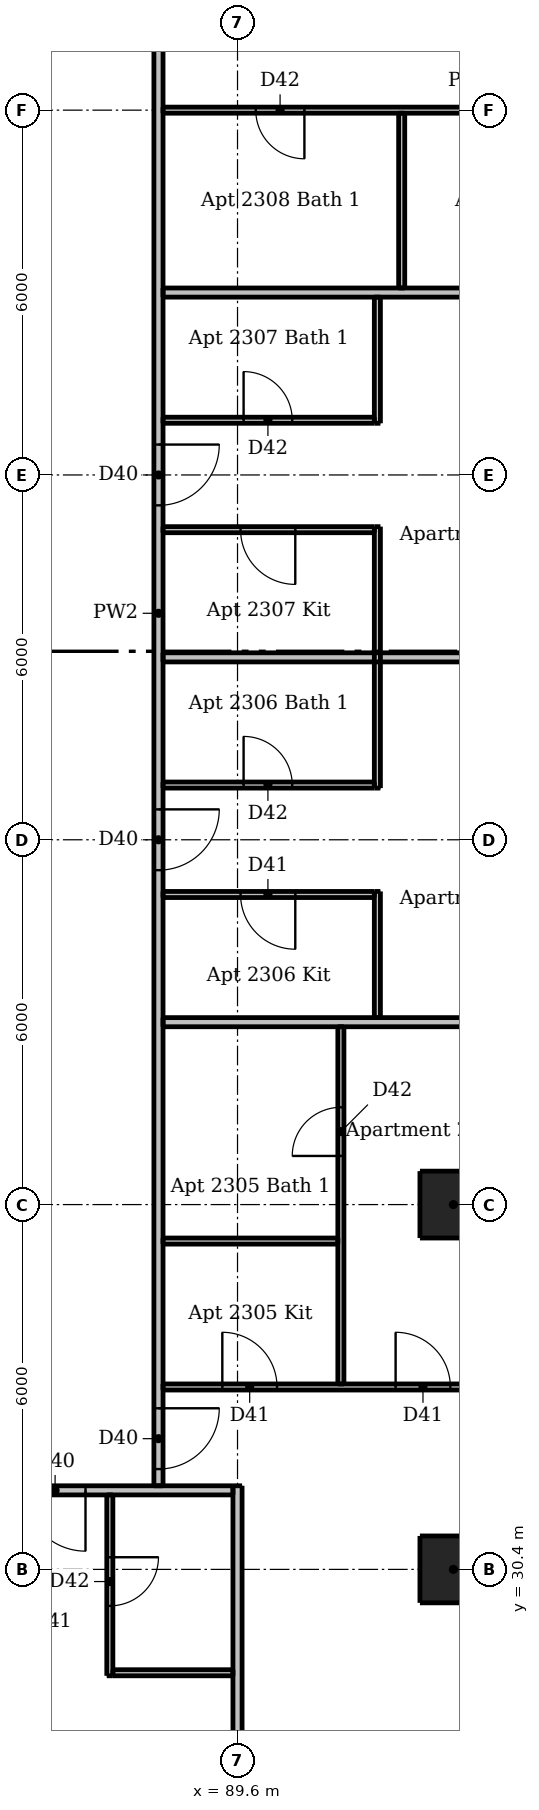
"""IFC4 building model, lengths in metres.
Left out: names, types, materials, properties, quantities, classifications, styles, units other than length and angle.
Written with IfcOpenShell. Run it as: python <this file> out.ifc"""

import sys

from ifc_helpers import new_model, si_unit, direction, frame, frame_2d, origin, origin_2d, place, context, subcontext, project, spatial, rectangle, extrude, element, fill, save


model = new_model("IFC4")
c1 = context("Model", 3, precision=1e-05, world=origin(), true_north=direction((0.0, 1.0)))
c2 = subcontext(c1, "Body", "Model", "MODEL_VIEW")
j1 = project(units=[si_unit("LENGTHUNIT", "METRE"), si_unit("PLANEANGLEUNIT", "RADIAN")], contexts=[c1])
p1 = place(None, origin())
s1 = spatial("IfcSite", under=j1, at=p1, CompositionType="ELEMENT")
p2 = place(p1, origin())
s2 = spatial("IfcBuilding", under=s1, at=p2, CompositionType="ELEMENT")
p3 = place(p2, frame((0.0, 0.0, 88.6)))
s3 = spatial("IfcBuildingStorey", under=s2, at=p3, CompositionType="ELEMENT", Elevation=88.6)
for number, where, z_axis, x_axis in (
    (1, (93.15, 30.4, 0.0), (0.0, 0.0, 1.0), (1.0, 0.0, 0.0)),
    (2, (93.15, 36.4, 0.0), (0.0, 0.0, 1.0), (1.0, 0.0, 0.0)),
):
    element("IfcColumn", number, at=place(p3, frame(where, z_axis=z_axis, x_axis=x_axis)), inside=s3, PredefinedType="COLUMN", context=c2, shape_type="SweptSolid", body=[
        extrude(rectangle(XDim=1.1, YDim=1.1, at=origin_2d()), origin(), (0.0, 0.0, 1.0), 3.05),
    ])
p4 = place(p3, frame((87.5, 31.625, 0.0), z_axis=(0.0, 0.0, 1.0), x_axis=(0.0, -1.0, 0.0)))
e3 = element("IfcWall", 3, at=p4, inside=s3, PredefinedType="PARTITIONING", context=c2, shape_type="SweptSolid", body=[
    extrude(rectangle(XDim=2.975, YDim=0.1, at=frame_2d((1.488, 0.0))), origin(), (0.0, 0.0, 1.0), 3.05),
])
p5 = place(p4, frame((1.025, 0.0, 0.0)))
e4 = element("IfcOpeningElement", 4, at=p5, cuts=e3, PredefinedType="OPENING", context=c2, shape_type="SweptSolid", body=[
    extrude(rectangle(XDim=0.8, YDim=2.1, at=frame_2d((0.4, 1.05))), frame((0.0, 0.06, 0.0), z_axis=(0.0, -1.0, 0.0), x_axis=(1.0, 0.0, 0.0)), (0.0, 0.0, 1.0), 0.12),
])
p6 = place(p3, frame((91.3, 33.45, 0.0), z_axis=(0.0, 0.0, 1.0), x_axis=(0.0, 1.0, 0.0)))
e5 = element("IfcWall", 5, at=p6, inside=s3, PredefinedType="PARTITIONING", context=c2, shape_type="SweptSolid", body=[
    extrude(rectangle(XDim=5.875, YDim=0.1, at=frame_2d((2.938, 0.0))), origin(), (0.0, 0.0, 1.0), 3.05),
])
p7 = place(p6, frame((3.75, 0.0, 0.0)))
e6 = element("IfcOpeningElement", 6, at=p7, cuts=e5, PredefinedType="OPENING", context=c2, shape_type="SweptSolid", body=[
    extrude(rectangle(XDim=0.8, YDim=2.1, at=frame_2d((0.4, 1.05))), frame((0.0, 0.06, 0.0), z_axis=(0.0, -1.0, 0.0), x_axis=(1.0, 0.0, 0.0)), (0.0, 0.0, 1.0), 0.12),
])
p8 = place(p3, frame((91.9, 39.475, 0.0), z_axis=(0.0, 0.0, 1.0), x_axis=(0.0, 1.0, 0.0)))
e7 = element("IfcWall", 7, at=p8, inside=s3, PredefinedType="PARTITIONING", context=c2, shape_type="SweptSolid", body=[
    extrude(rectangle(XDim=2.075, YDim=0.1, at=frame_2d((1.038, 0.0))), origin(), (0.0, 0.0, 1.0), 3.05),
])
p9 = place(p3, frame((91.9, 43.25, 0.0), z_axis=(0.0, 0.0, 1.0), x_axis=(0.0, 1.0, 0.0)))
e8 = element("IfcWall", 8, at=p9, inside=s3, PredefinedType="PARTITIONING", context=c2, shape_type="SweptSolid", body=[
    extrude(rectangle(XDim=4.3, YDim=0.1, at=frame_2d((2.15, 0.0))), origin(), (0.0, 0.0, 1.0), 3.05),
])
p10 = place(p3, frame((91.9, 49.25, 0.0), z_axis=(0.0, 0.0, 1.0), x_axis=(0.0, 1.0, 0.0)))
e9 = element("IfcWall", 9, at=p10, inside=s3, PredefinedType="PARTITIONING", context=c2, shape_type="SweptSolid", body=[
    extrude(rectangle(XDim=2.075, YDim=0.1, at=frame_2d((1.038, 0.0))), origin(), (0.0, 0.0, 1.0), 3.05),
])
p11 = place(p3, frame((92.3, 51.475, 0.0), z_axis=(0.0, 0.0, 1.0), x_axis=(0.0, 1.0, 0.0)))
e10 = element("IfcWall", 10, at=p11, inside=s3, PredefinedType="PARTITIONING", context=c2, shape_type="SweptSolid", body=[
    extrude(rectangle(XDim=2.875, YDim=0.1, at=frame_2d((1.438, 0.0))), origin(), (0.0, 0.0, 1.0), 3.05),
])
p12 = place(p3, frame((98.5, 54.4, 0.0), z_axis=(0.0, 0.0, 1.0), x_axis=(-1.0, 0.0, 0.0)))
e11 = element("IfcWall", 11, at=p12, inside=s3, PredefinedType="PARTITIONING", context=c2, shape_type="SweptSolid", body=[
    extrude(rectangle(XDim=10.125, YDim=0.1, at=frame_2d((5.062, 0.0))), origin(), (0.0, 0.0, 1.0), 2.516),
])
p13 = place(p12, frame((2.65, 0.0, 0.0)))
e12 = element("IfcOpeningElement", 12, at=p13, cuts=e11, PredefinedType="OPENING", context=c2, shape_type="SweptSolid", body=[
    extrude(rectangle(XDim=0.9, YDim=2.1, at=frame_2d((0.45, 1.05))), frame((0.0, 0.06, 0.0), z_axis=(0.0, -1.0, 0.0), x_axis=(1.0, 0.0, 0.0)), (0.0, 0.0, 1.0), 0.12),
])
p14 = place(p12, frame((7.8, 0.0, 0.0)))
e13 = element("IfcOpeningElement", 13, at=p14, cuts=e11, PredefinedType="OPENING", context=c2, shape_type="SweptSolid", body=[
    extrude(rectangle(XDim=0.8, YDim=2.1, at=frame_2d((0.4, 1.05))), frame((0.0, 0.06, 0.0), z_axis=(0.0, -1.0, 0.0), x_axis=(1.0, 0.0, 0.0)), (0.0, 0.0, 1.0), 0.12),
])
p15 = place(p3, frame((88.375, 49.3, 0.0), z_axis=(0.0, 0.0, 1.0), x_axis=(1.0, 0.0, 0.0)))
e14 = element("IfcWall", 14, at=p15, inside=s3, PredefinedType="PARTITIONING", context=c2, shape_type="SweptSolid", body=[
    extrude(rectangle(XDim=3.475, YDim=0.1, at=frame_2d((1.738, 0.0))), origin(), (0.0, 0.0, 1.0), 3.05),
])
p16 = place(p15, frame((1.325, 0.0, 0.0)))
e15 = element("IfcOpeningElement", 15, at=p16, cuts=e14, PredefinedType="OPENING", context=c2, shape_type="SweptSolid", body=[
    extrude(rectangle(XDim=0.8, YDim=2.1, at=frame_2d((0.4, 1.05))), frame((0.0, 0.06, 0.0), z_axis=(0.0, -1.0, 0.0), x_axis=(1.0, 0.0, 0.0)), (0.0, 0.0, 1.0), 0.12),
])
p17 = place(p3, frame((91.85, 47.5, 0.0), z_axis=(0.0, 0.0, 1.0), x_axis=(-1.0, 0.0, 0.0)))
e16 = element("IfcWall", 16, at=p17, inside=s3, PredefinedType="PARTITIONING", context=c2, shape_type="SweptSolid", body=[
    extrude(rectangle(XDim=3.475, YDim=0.1, at=frame_2d((1.738, 0.0))), origin(), (0.0, 0.0, 1.0), 3.05),
])
p18 = place(p17, frame((1.3, 0.0, 0.0)))
e17 = element("IfcOpeningElement", 17, at=p18, cuts=e16, PredefinedType="OPENING", context=c2, shape_type="SweptSolid", body=[
    extrude(rectangle(XDim=0.9, YDim=2.1, at=frame_2d((0.45, 1.05))), frame((0.0, 0.06, 0.0), z_axis=(0.0, -1.0, 0.0), x_axis=(1.0, 0.0, 0.0)), (0.0, 0.0, 1.0), 0.12),
])
p19 = place(p3, frame((88.375, 43.3, 0.0), z_axis=(0.0, 0.0, 1.0), x_axis=(1.0, 0.0, 0.0)))
e18 = element("IfcWall", 18, at=p19, inside=s3, PredefinedType="PARTITIONING", context=c2, shape_type="SweptSolid", body=[
    extrude(rectangle(XDim=3.475, YDim=0.1, at=frame_2d((1.738, 0.0))), origin(), (0.0, 0.0, 1.0), 3.05),
])
p20 = place(p19, frame((1.325, 0.0, 0.0)))
e19 = element("IfcOpeningElement", 19, at=p20, cuts=e18, PredefinedType="OPENING", context=c2, shape_type="SweptSolid", body=[
    extrude(rectangle(XDim=0.8, YDim=2.1, at=frame_2d((0.4, 1.05))), frame((0.0, 0.06, 0.0), z_axis=(0.0, -1.0, 0.0), x_axis=(1.0, 0.0, 0.0)), (0.0, 0.0, 1.0), 0.12),
])
p21 = place(p3, frame((91.85, 41.5, 0.0), z_axis=(0.0, 0.0, 1.0), x_axis=(-1.0, 0.0, 0.0)))
e20 = element("IfcWall", 20, at=p21, inside=s3, PredefinedType="PARTITIONING", context=c2, shape_type="SweptSolid", body=[
    extrude(rectangle(XDim=3.475, YDim=0.1, at=frame_2d((1.738, 0.0))), origin(), (0.0, 0.0, 1.0), 3.05),
])
p22 = place(p21, frame((1.3, 0.0, 0.0)))
e21 = element("IfcOpeningElement", 21, at=p22, cuts=e20, PredefinedType="OPENING", context=c2, shape_type="SweptSolid", body=[
    extrude(rectangle(XDim=0.9, YDim=2.1, at=frame_2d((0.45, 1.05))), frame((0.0, 0.06, 0.0), z_axis=(0.0, -1.0, 0.0), x_axis=(1.0, 0.0, 0.0)), (0.0, 0.0, 1.0), 0.12),
])
p23 = place(p3, frame((88.375, 35.8, 0.0), z_axis=(0.0, 0.0, 1.0), x_axis=(1.0, 0.0, 0.0)))
e22 = element("IfcWall", 22, at=p23, inside=s3, PredefinedType="PARTITIONING", context=c2, shape_type="SweptSolid", body=[
    extrude(rectangle(XDim=2.875, YDim=0.1, at=frame_2d((1.438, 0.0))), origin(), (0.0, 0.0, 1.0), 3.05),
])
p24 = place(p3, frame((88.375, 33.4, 0.0), z_axis=(0.0, 0.0, 1.0), x_axis=(1.0, 0.0, 0.0)))
e23 = element("IfcWall", 23, at=p24, inside=s3, PredefinedType="PARTITIONING", context=c2, shape_type="SweptSolid", body=[
    extrude(rectangle(XDim=5.625, YDim=0.1, at=frame_2d((2.812, 0.0))), origin(), (0.0, 0.0, 1.0), 3.05),
])
p25 = place(p24, frame((0.975, 0.0, 0.0)))
e24 = element("IfcOpeningElement", 24, at=p25, cuts=e23, PredefinedType="OPENING", context=c2, shape_type="SweptSolid", body=[
    extrude(rectangle(XDim=0.9, YDim=2.1, at=frame_2d((0.45, 1.05))), frame((0.0, 0.06, 0.0), z_axis=(0.0, -1.0, 0.0), x_axis=(1.0, 0.0, 0.0)), (0.0, 0.0, 1.0), 0.12),
])
p26 = place(p24, frame((3.825, 0.0, 0.0)))
e25 = element("IfcOpeningElement", 25, at=p26, cuts=e23, PredefinedType="OPENING", context=c2, shape_type="SweptSolid", body=[
    extrude(rectangle(XDim=0.9, YDim=2.1, at=frame_2d((0.45, 1.05))), frame((0.0, 0.06, 0.0), z_axis=(0.0, -1.0, 0.0), x_axis=(1.0, 0.0, 0.0)), (0.0, 0.0, 1.0), 0.12),
])
p27 = place(p3, frame((87.55, 28.7, 0.0), z_axis=(0.0, 0.0, 1.0), x_axis=(1.0, 0.0, 0.0)))
e26 = element("IfcWall", 26, at=p27, inside=s3, PredefinedType="PARTITIONING", context=c2, shape_type="SweptSolid", body=[
    extrude(rectangle(XDim=1.975, YDim=0.1, at=frame_2d((0.987, 0.0))), origin(), (0.0, 0.0, 1.0), 3.05),
])
p28 = place(p3, frame((88.3, 60.475, 0.0), z_axis=(0.0, 0.0, 1.0), x_axis=(0.0, -1.0, 0.0)))
e27 = element("IfcWall", 27, at=p28, inside=s3, PredefinedType="PARTITIONING", context=c2, shape_type="SweptSolid", body=[
    extrude(rectangle(XDim=28.7, YDim=0.15, at=frame_2d((14.35, 0.0))), origin(), (0.0, 0.0, 1.0), 3.05),
])
p29 = place(p28, frame((27.425, 0.0, 0.0)))
e28 = element("IfcOpeningElement", 28, at=p29, cuts=e27, PredefinedType="OPENING", context=c2, shape_type="SweptSolid", body=[
    extrude(rectangle(XDim=1.0, YDim=2.1, at=frame_2d((0.5, 1.05))), frame((0.0, 0.085, 0.0), z_axis=(0.0, -1.0, 0.0), x_axis=(1.0, 0.0, 0.0)), (0.0, 0.0, 1.0), 0.17),
])
p30 = place(p28, frame((17.575, 0.0, 0.0)))
e29 = element("IfcOpeningElement", 29, at=p30, cuts=e27, PredefinedType="OPENING", context=c2, shape_type="SweptSolid", body=[
    extrude(rectangle(XDim=1.0, YDim=2.1, at=frame_2d((0.5, 1.05))), frame((0.0, 0.085, 0.0), z_axis=(0.0, -1.0, 0.0), x_axis=(1.0, 0.0, 0.0)), (0.0, 0.0, 1.0), 0.17),
])
p31 = place(p28, frame((11.575, 0.0, 0.0)))
e30 = element("IfcOpeningElement", 30, at=p31, cuts=e27, PredefinedType="OPENING", context=c2, shape_type="SweptSolid", body=[
    extrude(rectangle(XDim=1.0, YDim=2.1, at=frame_2d((0.5, 1.05))), frame((0.0, 0.085, 0.0), z_axis=(0.0, -1.0, 0.0), x_axis=(1.0, 0.0, 0.0)), (0.0, 0.0, 1.0), 0.17),
])
p32 = place(p28, frame((3.775, 0.0, 0.0)))
e31 = element("IfcOpeningElement", 31, at=p32, cuts=e27, PredefinedType="OPENING", context=c2, shape_type="SweptSolid", body=[
    extrude(rectangle(XDim=1.0, YDim=2.1, at=frame_2d((0.5, 1.05))), frame((0.0, 0.085, 0.0), z_axis=(0.0, -1.0, 0.0), x_axis=(1.0, 0.0, 0.0)), (0.0, 0.0, 1.0), 0.17),
])
p33 = place(p3, frame((89.6, 26.0, 0.0), z_axis=(0.0, 0.0, 1.0), x_axis=(0.0, 1.0, 0.0)))
e32 = element("IfcWall", 32, at=p33, inside=s3, PredefinedType="PARTITIONING", context=c2, shape_type="SweptSolid", body=[
    extrude(rectangle(XDim=5.775, YDim=0.15, at=frame_2d((2.887, 0.0))), origin(), (0.0, 0.0, 1.0), 2.516),
])
for number, where, z_axis, x_axis in (
    (33, (88.375, 51.4, 0.0), (0.0, 0.0, 1.0), (1.0, 0.0, 0.0)),
    (34, (88.375, 45.4, 0.0), (0.0, 0.0, 1.0), (1.0, 0.0, 0.0)),
    (35, (88.375, 39.4, 0.0), (0.0, 0.0, 1.0), (1.0, 0.0, 0.0)),
):
    element("IfcWall", number, at=place(p3, frame(where, z_axis=z_axis, x_axis=x_axis)), inside=s3, PredefinedType="PARTITIONING", context=c2, shape_type="SweptSolid", body=[
        extrude(rectangle(XDim=10.125, YDim=0.15, at=frame_2d((5.062, 0.0))), origin(), (0.0, 0.0, 1.0), 3.05),
    ])
p34 = place(p3, frame((89.525, 31.7, 0.0), z_axis=(0.0, 0.0, 1.0), x_axis=(-1.0, 0.0, 0.0)))
e36 = element("IfcWall", 36, at=p34, inside=s3, PredefinedType="PARTITIONING", context=c2, shape_type="SweptSolid", body=[
    extrude(rectangle(XDim=28.75, YDim=0.15, at=frame_2d((14.375, 0.0))), origin(), (0.0, 0.0, 1.0), 3.05),
])
p35 = place(p34, frame((25.875, 0.0, 0.0)))
e37 = element("IfcOpeningElement", 37, at=p35, cuts=e36, PredefinedType="OPENING", context=c2, shape_type="SweptSolid", body=[
    extrude(rectangle(XDim=1.0, YDim=2.1, at=frame_2d((0.5, 1.05))), frame((0.0, 0.085, 0.0), z_axis=(0.0, -1.0, 0.0), x_axis=(1.0, 0.0, 0.0)), (0.0, 0.0, 1.0), 0.17),
])
p36 = place(p34, frame((14.425, 0.0, 0.0)))
e38 = element("IfcOpeningElement", 38, at=p36, cuts=e36, PredefinedType="OPENING", context=c2, shape_type="SweptSolid", body=[
    extrude(rectangle(XDim=1.0, YDim=2.1, at=frame_2d((0.5, 1.05))), frame((0.0, 0.085, 0.0), z_axis=(0.0, -1.0, 0.0), x_axis=(1.0, 0.0, 0.0)), (0.0, 0.0, 1.0), 0.17),
])
p37 = place(p34, frame((8.425, 0.0, 0.0)))
e39 = element("IfcOpeningElement", 39, at=p37, cuts=e36, PredefinedType="OPENING", context=c2, shape_type="SweptSolid", body=[
    extrude(rectangle(XDim=1.0, YDim=2.1, at=frame_2d((0.5, 1.05))), frame((0.0, 0.085, 0.0), z_axis=(0.0, -1.0, 0.0), x_axis=(1.0, 0.0, 0.0)), (0.0, 0.0, 1.0), 0.17),
])
p38 = place(p34, frame((2.425, 0.0, 0.0)))
e40 = element("IfcOpeningElement", 40, at=p38, cuts=e36, PredefinedType="OPENING", context=c2, shape_type="SweptSolid", body=[
    extrude(rectangle(XDim=1.0, YDim=2.1, at=frame_2d((0.5, 1.05))), frame((0.0, 0.085, 0.0), z_axis=(0.0, -1.0, 0.0), x_axis=(1.0, 0.0, 0.0)), (0.0, 0.0, 1.0), 0.17),
])
p39 = place(p38, origin())
e41 = element("IfcDoor", 41, at=p39, inside=s3, OperationType="SINGLE_SWING_LEFT", PredefinedType="DOOR", context=c2, shape_type="SweptSolid", body=[
    extrude(rectangle(XDim=1.0, YDim=2.1, at=frame_2d((0.5, 1.05))), frame((0.0, 0.025, 0.0), z_axis=(0.0, -1.0, 0.0), x_axis=(1.0, 0.0, 0.0)), (0.0, 0.0, 1.0), 0.05),
])
fill(e40, e41)
p40 = place(p5, origin())
e42 = element("IfcDoor", 42, at=p40, inside=s3, OperationType="SINGLE_SWING_LEFT", PredefinedType="DOOR", context=c2, shape_type="SweptSolid", body=[
    extrude(rectangle(XDim=0.8, YDim=2.1, at=frame_2d((0.4, 1.05))), frame((0.0, 0.025, 0.0), z_axis=(0.0, -1.0, 0.0), x_axis=(1.0, 0.0, 0.0)), (0.0, 0.0, 1.0), 0.05),
])
fill(e4, e42)
p41 = place(p29, origin())
e43 = element("IfcDoor", 43, at=p41, inside=s3, OperationType="SINGLE_SWING_LEFT", PredefinedType="DOOR", context=c2, shape_type="SweptSolid", body=[
    extrude(rectangle(XDim=1.0, YDim=2.1, at=frame_2d((0.5, 1.05))), frame((0.0, 0.025, 0.0), z_axis=(0.0, -1.0, 0.0), x_axis=(1.0, 0.0, 0.0)), (0.0, 0.0, 1.0), 0.05),
])
fill(e28, e43)
p42 = place(p25, origin())
e44 = element("IfcDoor", 44, at=p42, inside=s3, OperationType="SINGLE_SWING_LEFT", PredefinedType="DOOR", context=c2, shape_type="SweptSolid", body=[
    extrude(rectangle(XDim=0.9, YDim=2.1, at=frame_2d((0.45, 1.05))), frame((0.0, 0.025, 0.0), z_axis=(0.0, -1.0, 0.0), x_axis=(1.0, 0.0, 0.0)), (0.0, 0.0, 1.0), 0.05),
])
fill(e24, e44)
p43 = place(p26, origin())
e45 = element("IfcDoor", 45, at=p43, inside=s3, OperationType="SINGLE_SWING_LEFT", PredefinedType="DOOR", context=c2, shape_type="SweptSolid", body=[
    extrude(rectangle(XDim=0.9, YDim=2.1, at=frame_2d((0.45, 1.05))), frame((0.0, 0.025, 0.0), z_axis=(0.0, -1.0, 0.0), x_axis=(1.0, 0.0, 0.0)), (0.0, 0.0, 1.0), 0.05),
])
fill(e25, e45)
p44 = place(p7, origin())
e46 = element("IfcDoor", 46, at=p44, inside=s3, OperationType="SINGLE_SWING_LEFT", PredefinedType="DOOR", context=c2, shape_type="SweptSolid", body=[
    extrude(rectangle(XDim=0.8, YDim=2.1, at=frame_2d((0.4, 1.05))), frame((0.0, 0.025, 0.0), z_axis=(0.0, -1.0, 0.0), x_axis=(1.0, 0.0, 0.0)), (0.0, 0.0, 1.0), 0.05),
])
fill(e6, e46)
p45 = place(p30, origin())
e47 = element("IfcDoor", 47, at=p45, inside=s3, OperationType="SINGLE_SWING_LEFT", PredefinedType="DOOR", context=c2, shape_type="SweptSolid", body=[
    extrude(rectangle(XDim=1.0, YDim=2.1, at=frame_2d((0.5, 1.05))), frame((0.0, 0.025, 0.0), z_axis=(0.0, -1.0, 0.0), x_axis=(1.0, 0.0, 0.0)), (0.0, 0.0, 1.0), 0.05),
])
fill(e29, e47)
p46 = place(p22, origin())
e48 = element("IfcDoor", 48, at=p46, inside=s3, OperationType="SINGLE_SWING_LEFT", PredefinedType="DOOR", context=c2, shape_type="SweptSolid", body=[
    extrude(rectangle(XDim=0.9, YDim=2.1, at=frame_2d((0.45, 1.05))), frame((0.0, 0.025, 0.0), z_axis=(0.0, -1.0, 0.0), x_axis=(1.0, 0.0, 0.0)), (0.0, 0.0, 1.0), 0.05),
])
fill(e21, e48)
p47 = place(p20, origin())
e49 = element("IfcDoor", 49, at=p47, inside=s3, OperationType="SINGLE_SWING_LEFT", PredefinedType="DOOR", context=c2, shape_type="SweptSolid", body=[
    extrude(rectangle(XDim=0.8, YDim=2.1, at=frame_2d((0.4, 1.05))), frame((0.0, 0.025, 0.0), z_axis=(0.0, -1.0, 0.0), x_axis=(1.0, 0.0, 0.0)), (0.0, 0.0, 1.0), 0.05),
])
fill(e19, e49)
p48 = place(p31, origin())
e50 = element("IfcDoor", 50, at=p48, inside=s3, OperationType="SINGLE_SWING_LEFT", PredefinedType="DOOR", context=c2, shape_type="SweptSolid", body=[
    extrude(rectangle(XDim=1.0, YDim=2.1, at=frame_2d((0.5, 1.05))), frame((0.0, 0.025, 0.0), z_axis=(0.0, -1.0, 0.0), x_axis=(1.0, 0.0, 0.0)), (0.0, 0.0, 1.0), 0.05),
])
fill(e30, e50)
p49 = place(p18, origin())
e51 = element("IfcDoor", 51, at=p49, inside=s3, OperationType="SINGLE_SWING_LEFT", PredefinedType="DOOR", context=c2, shape_type="SweptSolid", body=[
    extrude(rectangle(XDim=0.9, YDim=2.1, at=frame_2d((0.45, 1.05))), frame((0.0, 0.025, 0.0), z_axis=(0.0, -1.0, 0.0), x_axis=(1.0, 0.0, 0.0)), (0.0, 0.0, 1.0), 0.05),
])
fill(e17, e51)
p50 = place(p16, origin())
e52 = element("IfcDoor", 52, at=p50, inside=s3, OperationType="SINGLE_SWING_LEFT", PredefinedType="DOOR", context=c2, shape_type="SweptSolid", body=[
    extrude(rectangle(XDim=0.8, YDim=2.1, at=frame_2d((0.4, 1.05))), frame((0.0, 0.025, 0.0), z_axis=(0.0, -1.0, 0.0), x_axis=(1.0, 0.0, 0.0)), (0.0, 0.0, 1.0), 0.05),
])
fill(e15, e52)
p51 = place(p14, origin())
e53 = element("IfcDoor", 53, at=p51, inside=s3, OperationType="SINGLE_SWING_LEFT", PredefinedType="DOOR", context=c2, shape_type="SweptSolid", body=[
    extrude(rectangle(XDim=0.8, YDim=2.1, at=frame_2d((0.4, 1.05))), frame((0.0, 0.025, 0.0), z_axis=(0.0, -1.0, 0.0), x_axis=(1.0, 0.0, 0.0)), (0.0, 0.0, 1.0), 0.05),
])
fill(e13, e53)
save(model, sys.argv[1])
